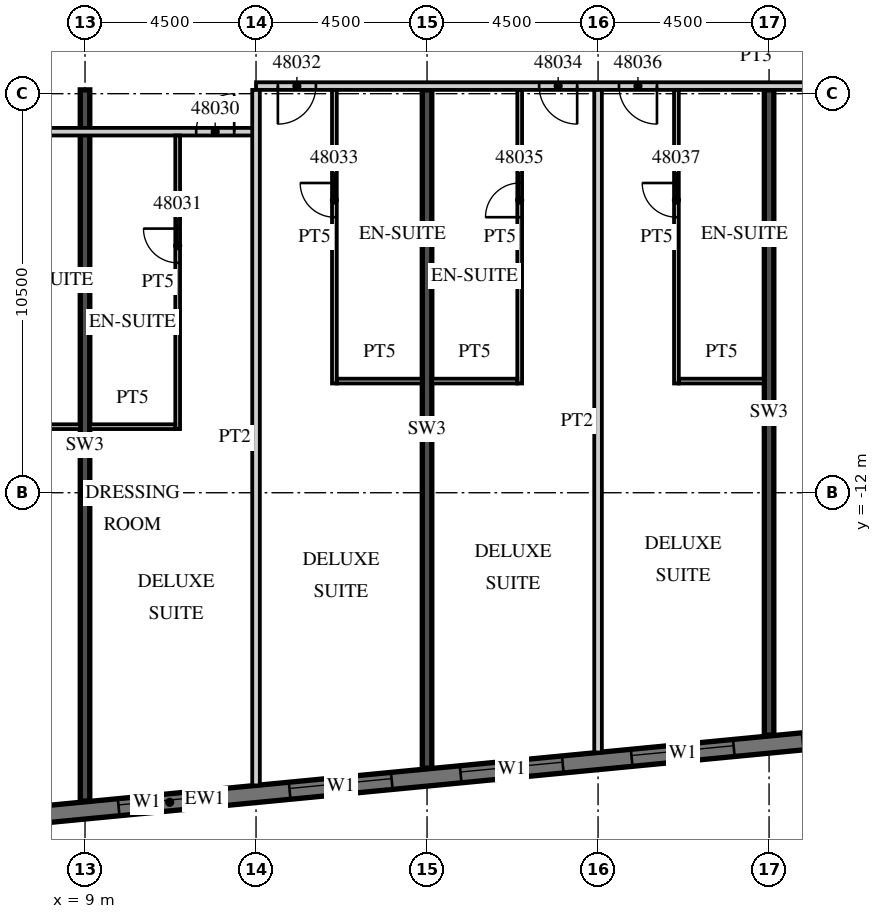
"""IFC4 building model, lengths in metres.
Left out: names, types, materials, properties, quantities, classifications, styles, units other than length and angle.
Written with IfcOpenShell. Run it as: python <this file> out.ifc"""

import sys

from ifc_helpers import new_model, si_unit, direction, frame, frame_2d, origin, place, context, subcontext, project, spatial, rectangle, extrude, element, fill, save


model = new_model("IFC4")
c1 = context("Model", 3, precision=1e-05, world=origin(), true_north=direction((0.0, 1.0)))
c2 = subcontext(c1, "Body", "Model", "MODEL_VIEW")
j1 = project(units=[si_unit("LENGTHUNIT", "METRE"), si_unit("PLANEANGLEUNIT", "RADIAN")], contexts=[c1])
p1 = place(None, origin())
s1 = spatial("IfcSite", under=j1, at=p1, CompositionType="ELEMENT")
p2 = place(p1, origin())
s2 = spatial("IfcBuilding", under=s1, at=p2, CompositionType="ELEMENT")
p3 = place(p2, frame((0.0, 0.0, 199.9)))
s3 = spatial("IfcBuildingStorey", under=s2, at=p3, CompositionType="ELEMENT", Elevation=199.9)
p4 = place(p3, frame((9.0, -20.112, 0.0), z_axis=(0.0, 0.0, 1.0), x_axis=(0.0, 1.0, 0.0)))
e1 = element("IfcWall", 1, at=p4, inside=s3, PredefinedType="SHEAR", context=c2, shape_type="SweptSolid", body=[
    extrude(rectangle(XDim=18.712, YDim=0.25, at=frame_2d((9.356, 0.0))), origin(), (0.0, 0.0, 1.0), 3.3),
])
p5 = place(p3, frame((18.0, -19.245, 0.0), z_axis=(0.0, 0.0, 1.0), x_axis=(0.0, 1.0, 0.0)))
e2 = element("IfcWall", 2, at=p5, inside=s3, PredefinedType="SHEAR", context=c2, shape_type="SweptSolid", body=[
    extrude(rectangle(XDim=17.845, YDim=0.25, at=frame_2d((8.923, 0.0))), origin(), (0.0, 0.0, 1.0), 3.3),
])
p6 = place(p3, frame((27.0, -18.379, 0.0), z_axis=(0.0, 0.0, 1.0), x_axis=(0.0, 1.0, 0.0)))
e3 = element("IfcWall", 3, at=p6, inside=s3, PredefinedType="SHEAR", context=c2, shape_type="SweptSolid", body=[
    extrude(rectangle(XDim=16.979, YDim=0.25, at=frame_2d((8.489, 0.0))), origin(), (0.0, 0.0, 1.0), 3.3),
])
p7 = place(p3, frame((-13.521, -22.529, 0.0), z_axis=(0.0, 0.0, 1.0), x_axis=(0.995396436651, 0.095843277819, 0.0)))
e4 = element("IfcWall", 4, at=p7, inside=s3, PredefinedType="SOLIDWALL", context=c2, shape_type="SweptSolid", body=[
    extrude(rectangle(XDim=51.578, YDim=0.45, at=frame_2d((25.789, 0.0))), origin(), (0.0, 0.0, 1.0), 3.02),
])
p8 = place(p7, frame((0.91, 0.0, 0.45)))
e5 = element("IfcOpeningElement", 5, at=p8, cuts=e4, PredefinedType="OPENING", context=c2, shape_type="SweptSolid", body=[
    extrude(rectangle(XDim=2.7, YDim=2.25, at=frame_2d((1.35, 1.125))), frame((0.0, 0.235, 0.0), z_axis=(0.0, -1.0, 0.0), x_axis=(1.0, 0.0, 0.0)), (0.0, 0.0, 1.0), 0.47),
])
p9 = place(p7, frame((5.431, 0.0, 0.45)))
e6 = element("IfcOpeningElement", 6, at=p9, cuts=e4, PredefinedType="OPENING", context=c2, shape_type="SweptSolid", body=[
    extrude(rectangle(XDim=2.7, YDim=2.25, at=frame_2d((1.35, 1.125))), frame((0.0, 0.235, 0.0), z_axis=(0.0, -1.0, 0.0), x_axis=(1.0, 0.0, 0.0)), (0.0, 0.0, 1.0), 0.47),
])
p10 = place(p7, frame((9.952, 0.0, 0.45)))
e7 = element("IfcOpeningElement", 7, at=p10, cuts=e4, PredefinedType="OPENING", context=c2, shape_type="SweptSolid", body=[
    extrude(rectangle(XDim=2.7, YDim=2.25, at=frame_2d((1.35, 1.125))), frame((0.0, 0.235, 0.0), z_axis=(0.0, -1.0, 0.0), x_axis=(1.0, 0.0, 0.0)), (0.0, 0.0, 1.0), 0.47),
])
p11 = place(p7, frame((14.473, 0.0, 0.45)))
e8 = element("IfcOpeningElement", 8, at=p11, cuts=e4, PredefinedType="OPENING", context=c2, shape_type="SweptSolid", body=[
    extrude(rectangle(XDim=2.7, YDim=2.25, at=frame_2d((1.35, 1.125))), frame((0.0, 0.235, 0.0), z_axis=(0.0, -1.0, 0.0), x_axis=(1.0, 0.0, 0.0)), (0.0, 0.0, 1.0), 0.47),
])
p12 = place(p7, frame((18.994, 0.0, 0.45)))
e9 = element("IfcOpeningElement", 9, at=p12, cuts=e4, PredefinedType="OPENING", context=c2, shape_type="SweptSolid", body=[
    extrude(rectangle(XDim=2.7, YDim=2.25, at=frame_2d((1.35, 1.125))), frame((0.0, 0.235, 0.0), z_axis=(0.0, -1.0, 0.0), x_axis=(1.0, 0.0, 0.0)), (0.0, 0.0, 1.0), 0.47),
])
p13 = place(p7, frame((23.514, 0.0, 0.45)))
e10 = element("IfcOpeningElement", 10, at=p13, cuts=e4, PredefinedType="OPENING", context=c2, shape_type="SweptSolid", body=[
    extrude(rectangle(XDim=2.7, YDim=2.25, at=frame_2d((1.35, 1.125))), frame((0.0, 0.235, 0.0), z_axis=(0.0, -1.0, 0.0), x_axis=(1.0, 0.0, 0.0)), (0.0, 0.0, 1.0), 0.47),
])
p14 = place(p7, frame((28.035, 0.0, 0.45)))
e11 = element("IfcOpeningElement", 11, at=p14, cuts=e4, PredefinedType="OPENING", context=c2, shape_type="SweptSolid", body=[
    extrude(rectangle(XDim=2.7, YDim=2.25, at=frame_2d((1.35, 1.125))), frame((0.0, 0.235, 0.0), z_axis=(0.0, -1.0, 0.0), x_axis=(1.0, 0.0, 0.0)), (0.0, 0.0, 1.0), 0.47),
])
p15 = place(p7, frame((32.556, 0.0, 0.45)))
e12 = element("IfcOpeningElement", 12, at=p15, cuts=e4, PredefinedType="OPENING", context=c2, shape_type="SweptSolid", body=[
    extrude(rectangle(XDim=2.7, YDim=2.25, at=frame_2d((1.35, 1.125))), frame((0.0, 0.235, 0.0), z_axis=(0.0, -1.0, 0.0), x_axis=(1.0, 0.0, 0.0)), (0.0, 0.0, 1.0), 0.47),
])
p16 = place(p7, frame((37.077, 0.0, 0.45)))
e13 = element("IfcOpeningElement", 13, at=p16, cuts=e4, PredefinedType="OPENING", context=c2, shape_type="SweptSolid", body=[
    extrude(rectangle(XDim=2.7, YDim=2.25, at=frame_2d((1.35, 1.125))), frame((0.0, 0.235, 0.0), z_axis=(0.0, -1.0, 0.0), x_axis=(1.0, 0.0, 0.0)), (0.0, 0.0, 1.0), 0.47),
])
p17 = place(p7, frame((41.598, 0.0, 0.45)))
e14 = element("IfcOpeningElement", 14, at=p17, cuts=e4, PredefinedType="OPENING", context=c2, shape_type="SweptSolid", body=[
    extrude(rectangle(XDim=2.7, YDim=2.25, at=frame_2d((1.35, 1.125))), frame((0.0, 0.235, 0.0), z_axis=(0.0, -1.0, 0.0), x_axis=(1.0, 0.0, 0.0)), (0.0, 0.0, 1.0), 0.47),
])
p18 = place(p7, frame((46.119, 0.0, 0.45)))
e15 = element("IfcOpeningElement", 15, at=p18, cuts=e4, PredefinedType="OPENING", context=c2, shape_type="SweptSolid", body=[
    extrude(rectangle(XDim=2.7, YDim=2.25, at=frame_2d((1.35, 1.125))), frame((0.0, 0.235, 0.0), z_axis=(0.0, -1.0, 0.0), x_axis=(1.0, 0.0, 0.0)), (0.0, 0.0, 1.0), 0.47),
])
p19 = place(p3, frame((-13.5, -2.5, 0.0), z_axis=(0.0, 0.0, 1.0), x_axis=(1.0, 0.0, 0.0)))
e16 = element("IfcWall", 16, at=p19, inside=s3, PredefinedType="PARTITIONING", context=c2, shape_type="SweptSolid", body=[
    extrude(rectangle(XDim=27.0, YDim=0.2, at=frame_2d((13.5, 0.0))), origin(), (0.0, 0.0, 1.0), 3.02),
])
p20 = place(p19, frame((2.925, 0.0, 0.0)))
e17 = element("IfcOpeningElement", 17, at=p20, cuts=e16, PredefinedType="OPENING", context=c2, shape_type="SweptSolid", body=[
    extrude(rectangle(XDim=1.0, YDim=2.1, at=frame_2d((0.5, 1.05))), frame((0.0, 0.11, 0.0), z_axis=(0.0, -1.0, 0.0), x_axis=(1.0, 0.0, 0.0)), (0.0, 0.0, 1.0), 0.22),
])
p21 = place(p19, frame((5.075, 0.0, 0.0)))
e18 = element("IfcOpeningElement", 18, at=p21, cuts=e16, PredefinedType="OPENING", context=c2, shape_type="SweptSolid", body=[
    extrude(rectangle(XDim=1.0, YDim=2.1, at=frame_2d((0.5, 1.05))), frame((0.0, 0.11, 0.0), z_axis=(0.0, -1.0, 0.0), x_axis=(1.0, 0.0, 0.0)), (0.0, 0.0, 1.0), 0.22),
])
p22 = place(p19, frame((11.925, 0.0, 0.0)))
e19 = element("IfcOpeningElement", 19, at=p22, cuts=e16, PredefinedType="OPENING", context=c2, shape_type="SweptSolid", body=[
    extrude(rectangle(XDim=1.0, YDim=2.1, at=frame_2d((0.5, 1.05))), frame((0.0, 0.11, 0.0), z_axis=(0.0, -1.0, 0.0), x_axis=(1.0, 0.0, 0.0)), (0.0, 0.0, 1.0), 0.22),
])
p23 = place(p19, frame((15.938, 0.0, 0.0)))
e20 = element("IfcOpeningElement", 20, at=p23, cuts=e16, PredefinedType="OPENING", context=c2, shape_type="SweptSolid", body=[
    extrude(rectangle(XDim=1.2, YDim=2.1, at=frame_2d((0.6, 1.05))), frame((0.0, 0.11, 0.0), z_axis=(0.0, -1.0, 0.0), x_axis=(1.0, 0.0, 0.0)), (0.0, 0.0, 1.0), 0.22),
])
p24 = place(p19, frame((25.425, 0.0, 0.0)))
e21 = element("IfcOpeningElement", 21, at=p24, cuts=e16, PredefinedType="OPENING", context=c2, shape_type="SweptSolid", body=[
    extrude(rectangle(XDim=1.0, YDim=2.1, at=frame_2d((0.5, 1.05))), frame((0.0, 0.11, 0.0), z_axis=(0.0, -1.0, 0.0), x_axis=(1.0, 0.0, 0.0)), (0.0, 0.0, 1.0), 0.22),
])
p25 = place(p3, frame((13.5, -1.3, 0.0), z_axis=(0.0, 0.0, 1.0), x_axis=(1.0, 0.0, 0.0)))
e22 = element("IfcWall", 22, at=p25, inside=s3, PredefinedType="PARTITIONING", context=c2, shape_type="SweptSolid", body=[
    extrude(rectangle(XDim=26.317, YDim=0.2, at=frame_2d((13.158, 0.0))), origin(), (0.0, 0.0, 1.0), 3.02),
])
p26 = place(p25, frame((0.575, 0.0, 0.0)))
e23 = element("IfcOpeningElement", 23, at=p26, cuts=e22, PredefinedType="OPENING", context=c2, shape_type="SweptSolid", body=[
    extrude(rectangle(XDim=1.0, YDim=2.1, at=frame_2d((0.5, 1.05))), frame((0.0, 0.11, 0.0), z_axis=(0.0, -1.0, 0.0), x_axis=(1.0, 0.0, 0.0)), (0.0, 0.0, 1.0), 0.22),
])
p27 = place(p25, frame((7.45, 0.0, 0.0)))
e24 = element("IfcOpeningElement", 24, at=p27, cuts=e22, PredefinedType="OPENING", context=c2, shape_type="SweptSolid", body=[
    extrude(rectangle(XDim=1.0, YDim=2.1, at=frame_2d((0.5, 1.05))), frame((0.0, 0.11, 0.0), z_axis=(0.0, -1.0, 0.0), x_axis=(1.0, 0.0, 0.0)), (0.0, 0.0, 1.0), 0.22),
])
p28 = place(p25, frame((9.55, 0.0, 0.0)))
e25 = element("IfcOpeningElement", 25, at=p28, cuts=e22, PredefinedType="OPENING", context=c2, shape_type="SweptSolid", body=[
    extrude(rectangle(XDim=1.0, YDim=2.1, at=frame_2d((0.5, 1.05))), frame((0.0, 0.11, 0.0), z_axis=(0.0, -1.0, 0.0), x_axis=(1.0, 0.0, 0.0)), (0.0, 0.0, 1.0), 0.22),
])
p29 = place(p25, frame((15.938, 0.0, 0.0)))
e26 = element("IfcOpeningElement", 26, at=p29, cuts=e22, PredefinedType="OPENING", context=c2, shape_type="SweptSolid", body=[
    extrude(rectangle(XDim=1.2, YDim=2.1, at=frame_2d((0.6, 1.05))), frame((0.0, 0.11, 0.0), z_axis=(0.0, -1.0, 0.0), x_axis=(1.0, 0.0, 0.0)), (0.0, 0.0, 1.0), 0.22),
])
p30 = place(p25, frame((25.267, 0.0, 0.0)))
e27 = element("IfcOpeningElement", 27, at=p30, cuts=e22, PredefinedType="OPENING", context=c2, shape_type="SweptSolid", body=[
    extrude(rectangle(XDim=0.9, YDim=2.1, at=frame_2d((0.45, 1.05))), frame((0.0, 0.11, 0.0), z_axis=(0.0, -1.0, 0.0), x_axis=(1.0, 0.0, 0.0)), (0.0, 0.0, 1.0), 0.22),
])
p31 = place(p3, frame((6.075, -10.262, 0.0), z_axis=(0.0, 0.0, 1.0), x_axis=(1.0, 0.0, 0.0)))
e28 = element("IfcWall", 28, at=p31, inside=s3, PredefinedType="PARTITIONING", context=c2, shape_type="SweptSolid", body=[
    extrude(rectangle(XDim=2.8, YDim=0.125, at=frame_2d((1.4, 0.0))), origin(), (0.0, 0.0, 1.0), 3.02),
])
p32 = place(p3, frame((13.5, -19.701, 0.0), z_axis=(0.0, 0.0, 1.0), x_axis=(0.0, 1.0, 0.0)))
e29 = element("IfcWall", 29, at=p32, inside=s3, PredefinedType="PARTITIONING", context=c2, shape_type="SweptSolid", body=[
    extrude(rectangle(XDim=18.301, YDim=0.2, at=frame_2d((9.15, 0.0))), origin(), (0.0, 0.0, 1.0), 3.02),
])
p33 = place(p3, frame((11.438, -10.325, 0.0), z_axis=(0.0, 0.0, 1.0), x_axis=(0.0, 1.0, 0.0)))
e30 = element("IfcWall", 30, at=p33, inside=s3, PredefinedType="PARTITIONING", context=c2, shape_type="SweptSolid", body=[
    extrude(rectangle(XDim=7.725, YDim=0.125, at=frame_2d((3.862, 0.0))), origin(), (0.0, 0.0, 1.0), 3.02),
])
p34 = place(p33, frame((4.375, 0.0, 0.0)))
e31 = element("IfcOpeningElement", 31, at=p34, cuts=e30, PredefinedType="OPENING", context=c2, shape_type="SweptSolid", body=[
    extrude(rectangle(XDim=0.9, YDim=2.1, at=frame_2d((0.45, 1.05))), frame((0.0, 0.073, 0.0), z_axis=(0.0, -1.0, 0.0), x_axis=(1.0, 0.0, 0.0)), (0.0, 0.0, 1.0), 0.145),
])
p35 = place(p3, frame((9.125, -10.262, 0.0), z_axis=(0.0, 0.0, 1.0), x_axis=(1.0, 0.0, 0.0)))
e32 = element("IfcWall", 32, at=p35, inside=s3, PredefinedType="PARTITIONING", context=c2, shape_type="SweptSolid", body=[
    extrude(rectangle(XDim=2.25, YDim=0.125, at=frame_2d((1.125, 0.0))), origin(), (0.0, 0.0, 1.0), 3.02),
])
p36 = place(p3, frame((15.562, -9.125, 0.0), z_axis=(0.0, 0.0, 1.0), x_axis=(0.0, 1.0, 0.0)))
e33 = element("IfcWall", 33, at=p36, inside=s3, PredefinedType="PARTITIONING", context=c2, shape_type="SweptSolid", body=[
    extrude(rectangle(XDim=7.725, YDim=0.125, at=frame_2d((3.863, 0.0))), origin(), (0.0, 0.0, 1.0), 3.02),
])
p37 = place(p36, frame((4.375, 0.0, 0.0)))
e34 = element("IfcOpeningElement", 34, at=p37, cuts=e33, PredefinedType="OPENING", context=c2, shape_type="SweptSolid", body=[
    extrude(rectangle(XDim=0.9, YDim=2.1, at=frame_2d((0.45, 1.05))), frame((0.0, 0.073, 0.0), z_axis=(0.0, -1.0, 0.0), x_axis=(1.0, 0.0, 0.0)), (0.0, 0.0, 1.0), 0.145),
])
p38 = place(p3, frame((15.625, -9.062, 0.0), z_axis=(0.0, 0.0, 1.0), x_axis=(1.0, 0.0, 0.0)))
e35 = element("IfcWall", 35, at=p38, inside=s3, PredefinedType="PARTITIONING", context=c2, shape_type="SweptSolid", body=[
    extrude(rectangle(XDim=2.25, YDim=0.125, at=frame_2d((1.125, 0.0))), origin(), (0.0, 0.0, 1.0), 3.02),
])
p39 = place(p3, frame((22.5, -18.834, 0.0), z_axis=(0.0, 0.0, 1.0), x_axis=(0.0, 1.0, 0.0)))
e36 = element("IfcWall", 36, at=p39, inside=s3, PredefinedType="PARTITIONING", context=c2, shape_type="SweptSolid", body=[
    extrude(rectangle(XDim=17.434, YDim=0.2, at=frame_2d((8.717, 0.0))), origin(), (0.0, 0.0, 1.0), 3.02),
])
p40 = place(p3, frame((20.438, -9.125, 0.0), z_axis=(0.0, 0.0, 1.0), x_axis=(0.0, 1.0, 0.0)))
e37 = element("IfcWall", 37, at=p40, inside=s3, PredefinedType="PARTITIONING", context=c2, shape_type="SweptSolid", body=[
    extrude(rectangle(XDim=7.725, YDim=0.125, at=frame_2d((3.863, 0.0))), origin(), (0.0, 0.0, 1.0), 3.02),
])
p41 = place(p40, frame((4.375, 0.0, 0.0)))
e38 = element("IfcOpeningElement", 38, at=p41, cuts=e37, PredefinedType="OPENING", context=c2, shape_type="SweptSolid", body=[
    extrude(rectangle(XDim=0.9, YDim=2.1, at=frame_2d((0.45, 1.05))), frame((0.0, 0.073, 0.0), z_axis=(0.0, -1.0, 0.0), x_axis=(1.0, 0.0, 0.0)), (0.0, 0.0, 1.0), 0.145),
])
p42 = place(p3, frame((18.125, -9.062, 0.0), z_axis=(0.0, 0.0, 1.0), x_axis=(1.0, 0.0, 0.0)))
e39 = element("IfcWall", 39, at=p42, inside=s3, PredefinedType="PARTITIONING", context=c2, shape_type="SweptSolid", body=[
    extrude(rectangle(XDim=2.25, YDim=0.125, at=frame_2d((1.125, 0.0))), origin(), (0.0, 0.0, 1.0), 3.02),
])
p43 = place(p3, frame((24.562, -9.125, 0.0), z_axis=(0.0, 0.0, 1.0), x_axis=(0.0, 1.0, 0.0)))
e40 = element("IfcWall", 40, at=p43, inside=s3, PredefinedType="PARTITIONING", context=c2, shape_type="SweptSolid", body=[
    extrude(rectangle(XDim=7.725, YDim=0.125, at=frame_2d((3.863, 0.0))), origin(), (0.0, 0.0, 1.0), 3.02),
])
p44 = place(p43, frame((4.375, 0.0, 0.0)))
e41 = element("IfcOpeningElement", 41, at=p44, cuts=e40, PredefinedType="OPENING", context=c2, shape_type="SweptSolid", body=[
    extrude(rectangle(XDim=0.9, YDim=2.1, at=frame_2d((0.45, 1.05))), frame((0.0, 0.073, 0.0), z_axis=(0.0, -1.0, 0.0), x_axis=(1.0, 0.0, 0.0)), (0.0, 0.0, 1.0), 0.145),
])
p45 = place(p3, frame((24.625, -9.062, 0.0), z_axis=(0.0, 0.0, 1.0), x_axis=(1.0, 0.0, 0.0)))
e42 = element("IfcWall", 42, at=p45, inside=s3, PredefinedType="PARTITIONING", context=c2, shape_type="SweptSolid", body=[
    extrude(rectangle(XDim=2.25, YDim=0.125, at=frame_2d((1.125, 0.0))), origin(), (0.0, 0.0, 1.0), 3.02),
])
p46 = place(p13, origin())
e43 = element("IfcWindow", 43, at=p46, inside=s3, PartitioningType="SINGLE_PANEL", PredefinedType="WINDOW", context=c2, shape_type="SweptSolid", body=[
    extrude(rectangle(XDim=2.7, YDim=2.25, at=frame_2d((1.35, 1.125))), frame((0.0, 0.09, 0.0), z_axis=(0.0, -1.0, 0.0), x_axis=(1.0, 0.0, 0.0)), (0.0, 0.0, 1.0), 0.06),
])
fill(e10, e43)
p47 = place(p14, origin())
e44 = element("IfcWindow", 44, at=p47, inside=s3, PartitioningType="SINGLE_PANEL", PredefinedType="WINDOW", context=c2, shape_type="SweptSolid", body=[
    extrude(rectangle(XDim=2.7, YDim=2.25, at=frame_2d((1.35, 1.125))), frame((0.0, 0.09, 0.0), z_axis=(0.0, -1.0, 0.0), x_axis=(1.0, 0.0, 0.0)), (0.0, 0.0, 1.0), 0.06),
])
fill(e11, e44)
p48 = place(p15, origin())
e45 = element("IfcWindow", 45, at=p48, inside=s3, PartitioningType="SINGLE_PANEL", PredefinedType="WINDOW", context=c2, shape_type="SweptSolid", body=[
    extrude(rectangle(XDim=2.7, YDim=2.25, at=frame_2d((1.35, 1.125))), frame((0.0, 0.09, 0.0), z_axis=(0.0, -1.0, 0.0), x_axis=(1.0, 0.0, 0.0)), (0.0, 0.0, 1.0), 0.06),
])
fill(e12, e45)
p49 = place(p16, origin())
e46 = element("IfcWindow", 46, at=p49, inside=s3, PartitioningType="SINGLE_PANEL", PredefinedType="WINDOW", context=c2, shape_type="SweptSolid", body=[
    extrude(rectangle(XDim=2.7, YDim=2.25, at=frame_2d((1.35, 1.125))), frame((0.0, 0.09, 0.0), z_axis=(0.0, -1.0, 0.0), x_axis=(1.0, 0.0, 0.0)), (0.0, 0.0, 1.0), 0.06),
])
fill(e13, e46)
p50 = place(p24, origin())
e47 = element("IfcDoor", 47, at=p50, inside=s3, OperationType="SINGLE_SWING_RIGHT", PredefinedType="DOOR", context=c2, shape_type="SweptSolid", body=[
    extrude(rectangle(XDim=1.0, YDim=2.1, at=frame_2d((0.5, 1.05))), frame((0.0, 0.025, 0.0), z_axis=(0.0, -1.0, 0.0), x_axis=(1.0, 0.0, 0.0)), (0.0, 0.0, 1.0), 0.05),
])
fill(e21, e47)
p51 = place(p34, origin())
e48 = element("IfcDoor", 48, at=p51, inside=s3, OperationType="SINGLE_SWING_RIGHT", PredefinedType="DOOR", context=c2, shape_type="SweptSolid", body=[
    extrude(rectangle(XDim=0.9, YDim=2.1, at=frame_2d((0.45, 1.05))), frame((0.0, 0.025, 0.0), z_axis=(0.0, -1.0, 0.0), x_axis=(1.0, 0.0, 0.0)), (0.0, 0.0, 1.0), 0.05),
])
fill(e31, e48)
p52 = place(p26, origin())
e49 = element("IfcDoor", 49, at=p52, inside=s3, OperationType="SINGLE_SWING_LEFT", PredefinedType="DOOR", context=c2, shape_type="SweptSolid", body=[
    extrude(rectangle(XDim=1.0, YDim=2.1, at=frame_2d((0.5, 1.05))), frame((0.0, 0.025, 0.0), z_axis=(0.0, -1.0, 0.0), x_axis=(1.0, 0.0, 0.0)), (0.0, 0.0, 1.0), 0.05),
])
fill(e23, e49)
p53 = place(p37, origin())
e50 = element("IfcDoor", 50, at=p53, inside=s3, OperationType="SINGLE_SWING_RIGHT", PredefinedType="DOOR", context=c2, shape_type="SweptSolid", body=[
    extrude(rectangle(XDim=0.9, YDim=2.1, at=frame_2d((0.45, 1.05))), frame((0.0, 0.025, 0.0), z_axis=(0.0, -1.0, 0.0), x_axis=(1.0, 0.0, 0.0)), (0.0, 0.0, 1.0), 0.05),
])
fill(e34, e50)
p54 = place(p27, origin())
e51 = element("IfcDoor", 51, at=p54, inside=s3, OperationType="SINGLE_SWING_RIGHT", PredefinedType="DOOR", context=c2, shape_type="SweptSolid", body=[
    extrude(rectangle(XDim=1.0, YDim=2.1, at=frame_2d((0.5, 1.05))), frame((0.0, 0.025, 0.0), z_axis=(0.0, -1.0, 0.0), x_axis=(1.0, 0.0, 0.0)), (0.0, 0.0, 1.0), 0.05),
])
fill(e24, e51)
p55 = place(p41, origin())
e52 = element("IfcDoor", 52, at=p55, inside=s3, OperationType="SINGLE_SWING_LEFT", PredefinedType="DOOR", context=c2, shape_type="SweptSolid", body=[
    extrude(rectangle(XDim=0.9, YDim=2.1, at=frame_2d((0.45, 1.05))), frame((0.0, 0.025, 0.0), z_axis=(0.0, -1.0, 0.0), x_axis=(1.0, 0.0, 0.0)), (0.0, 0.0, 1.0), 0.05),
])
fill(e38, e52)
p56 = place(p28, origin())
e53 = element("IfcDoor", 53, at=p56, inside=s3, OperationType="SINGLE_SWING_RIGHT", PredefinedType="DOOR", context=c2, shape_type="SweptSolid", body=[
    extrude(rectangle(XDim=1.0, YDim=2.1, at=frame_2d((0.5, 1.05))), frame((0.0, 0.025, 0.0), z_axis=(0.0, -1.0, 0.0), x_axis=(1.0, 0.0, 0.0)), (0.0, 0.0, 1.0), 0.05),
])
fill(e25, e53)
p57 = place(p44, origin())
e54 = element("IfcDoor", 54, at=p57, inside=s3, OperationType="SINGLE_SWING_RIGHT", PredefinedType="DOOR", context=c2, shape_type="SweptSolid", body=[
    extrude(rectangle(XDim=0.9, YDim=2.1, at=frame_2d((0.45, 1.05))), frame((0.0, 0.025, 0.0), z_axis=(0.0, -1.0, 0.0), x_axis=(1.0, 0.0, 0.0)), (0.0, 0.0, 1.0), 0.05),
])
fill(e41, e54)
save(model, sys.argv[1])
